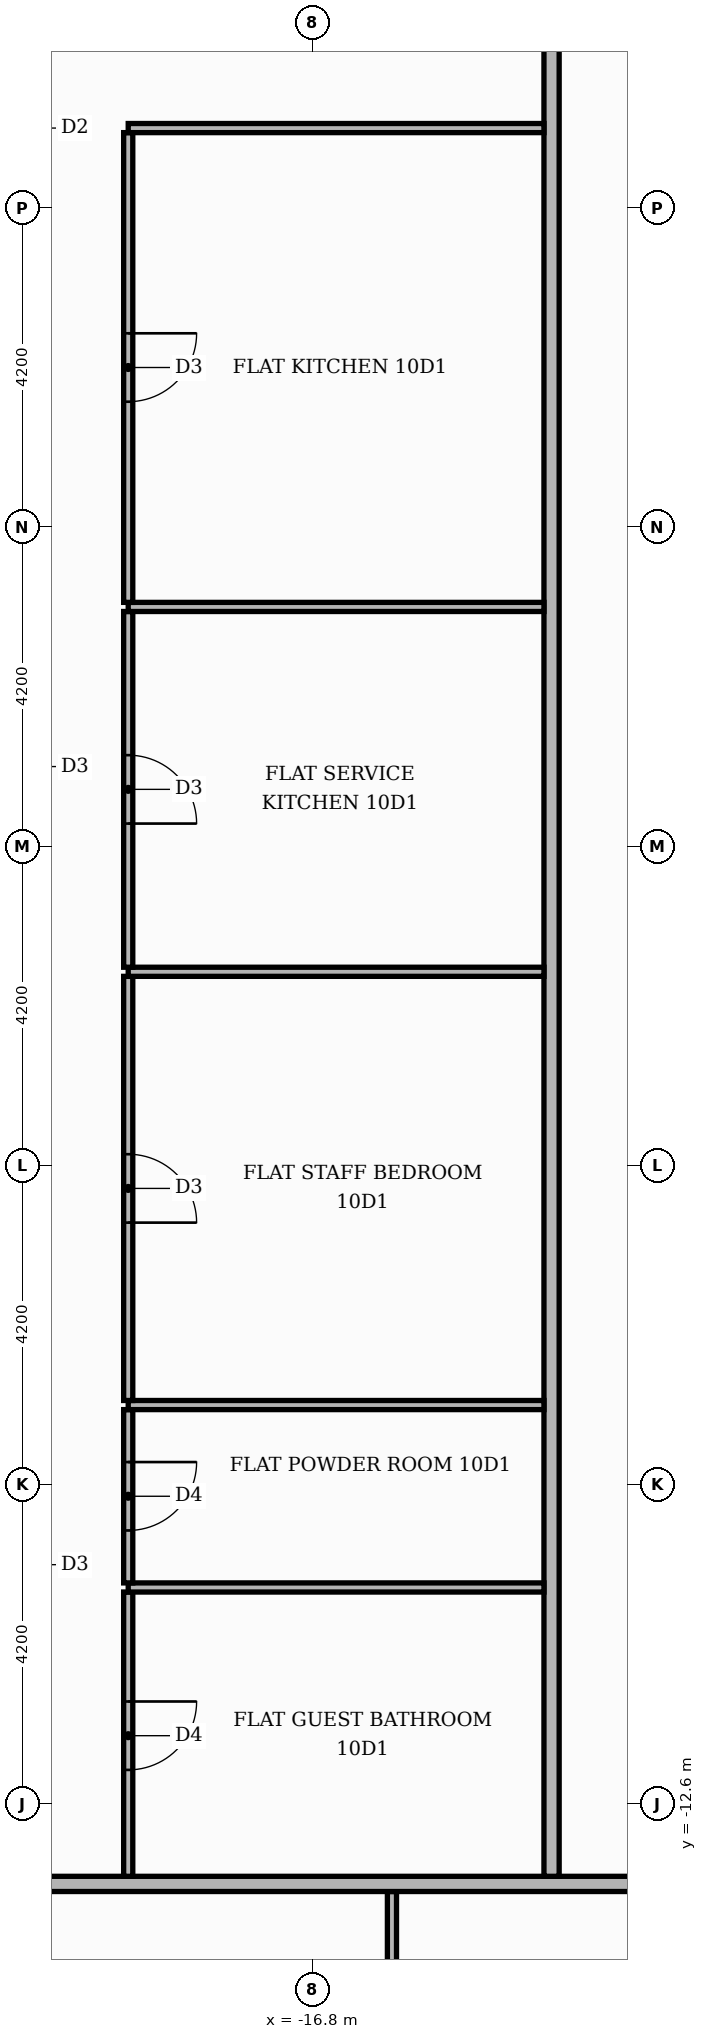
"""IFC4 building model, lengths in metres.
Left out: names, types, materials, properties, quantities, classifications, styles, units other than length and angle.
Written with IfcOpenShell. Run it as: python <this file> out.ifc"""

import sys

from ifc_helpers import new_model, si_unit, direction, frame, frame_2d, origin, place, context, subcontext, project, spatial, rectangle, extrude, element, fill, save


model = new_model("IFC4")
c1 = context("Model", 3, precision=1e-05, world=origin(), true_north=direction((0.0, 1.0)))
c2 = subcontext(c1, "Body", "Model", "MODEL_VIEW")
j1 = project(units=[si_unit("LENGTHUNIT", "METRE"), si_unit("PLANEANGLEUNIT", "RADIAN")], contexts=[c1])
p1 = place(None, origin())
s1 = spatial("IfcSite", under=j1, at=p1, CompositionType="ELEMENT")
p2 = place(p1, origin())
s2 = spatial("IfcBuilding", under=s1, at=p2, CompositionType="ELEMENT")
p3 = place(p2, frame((0.0, 0.0, 46.5)))
s3 = spatial("IfcBuildingStorey", under=s2, at=p3, CompositionType="ELEMENT", Elevation=46.5)
p4 = place(p3, frame((-15.75, -20.66, 0.0), z_axis=(0.0, 0.0, 1.0), x_axis=(0.0, 1.0, 0.0)))
e1 = element("IfcWall", 1, at=p4, inside=s3, PredefinedType="PARTITIONING", context=c2, shape_type="SweptSolid", body=[
    extrude(rectangle(XDim=6.91, YDim=0.12, at=frame_2d((3.455, 0.0))), origin(), (0.0, 0.0, 1.0), 3.48),
])
p5 = place(p4, frame((2.975, 0.0, 0.0)))
e2 = element("IfcOpeningElement", 2, at=p5, cuts=e1, PredefinedType="OPENING", context=c2, shape_type="SweptSolid", body=[
    extrude(rectangle(XDim=1.0, YDim=2.1, at=frame_2d((0.5, 1.05))), frame((0.0, 0.07, 0.0), z_axis=(0.0, -1.0, 0.0), x_axis=(1.0, 0.0, 0.0)), (0.0, 0.0, 1.0), 0.14),
])
p6 = place(p3, frame((-25.42, -13.65, 0.0), z_axis=(0.0, 0.0, 1.0), x_axis=(1.0, 0.0, 0.0)))
e3 = element("IfcWall", 3, at=p6, inside=s3, PredefinedType="PARTITIONING", context=c2, shape_type="SweptSolid", body=[
    extrude(rectangle(XDim=39.07, YDim=0.2, at=frame_2d((19.535, 0.0))), origin(), (0.0, 0.0, 1.0), 3.48),
])
p7 = place(p6, frame((13.32, 0.0, 0.0)))
e4 = element("IfcOpeningElement", 4, at=p7, cuts=e3, PredefinedType="OPENING", context=c2, shape_type="SweptSolid", body=[
    extrude(rectangle(XDim=1.1, YDim=2.4, at=frame_2d((0.55, 1.2))), frame((0.0, 0.11, 0.0), z_axis=(0.0, -1.0, 0.0), x_axis=(1.0, 0.0, 0.0)), (0.0, 0.0, 1.0), 0.22),
])
p8 = place(p6, frame((21.72, 0.0, 0.0)))
e5 = element("IfcOpeningElement", 5, at=p8, cuts=e3, PredefinedType="OPENING", context=c2, shape_type="SweptSolid", body=[
    extrude(rectangle(XDim=1.1, YDim=2.4, at=frame_2d((0.55, 1.2))), frame((0.0, 0.11, 0.0), z_axis=(0.0, -1.0, 0.0), x_axis=(1.0, 0.0, 0.0)), (0.0, 0.0, 1.0), 0.22),
])
p9 = place(p3, frame((-19.22, -13.55, 0.0), z_axis=(0.0, 0.0, 1.0), x_axis=(0.0, 1.0, 0.0)))
e6 = element("IfcWall", 6, at=p9, inside=s3, PredefinedType="PARTITIONING", context=c2, shape_type="SweptSolid", body=[
    extrude(rectangle(XDim=3.74, YDim=0.12, at=frame_2d((1.87, 0.0))), origin(), (0.0, 0.0, 1.0), 3.48),
])
p10 = place(p9, frame((1.4, 0.0, 0.0)))
e7 = element("IfcOpeningElement", 7, at=p10, cuts=e6, PredefinedType="OPENING", context=c2, shape_type="SweptSolid", body=[
    extrude(rectangle(XDim=0.9, YDim=2.1, at=frame_2d((0.45, 1.05))), frame((0.0, 0.07, 0.0), z_axis=(0.0, -1.0, 0.0), x_axis=(1.0, 0.0, 0.0)), (0.0, 0.0, 1.0), 0.14),
])
p11 = place(p3, frame((-13.65, -13.55, 0.0), z_axis=(0.0, 0.0, 1.0), x_axis=(0.0, 1.0, 0.0)))
e8 = element("IfcWall", 8, at=p11, inside=s3, PredefinedType="PARTITIONING", context=c2, shape_type="SweptSolid", body=[
    extrude(rectangle(XDim=27.1, YDim=0.2, at=frame_2d((13.55, 0.0))), origin(), (0.0, 0.0, 1.0), 3.48),
])
p12 = place(p11, frame((24.55, 0.0, 0.0)))
e9 = element("IfcOpeningElement", 9, at=p12, cuts=e8, PredefinedType="OPENING", context=c2, shape_type="SweptSolid", body=[
    extrude(rectangle(XDim=1.1, YDim=2.4, at=frame_2d((0.55, 1.2))), frame((0.0, 0.11, 0.0), z_axis=(0.0, -1.0, 0.0), x_axis=(1.0, 0.0, 0.0)), (0.0, 0.0, 1.0), 0.22),
])
p13 = place(p3, frame((-19.22, -9.75, 0.0), z_axis=(0.0, 0.0, 1.0), x_axis=(1.0, 0.0, 0.0)))
e10 = element("IfcWall", 10, at=p13, inside=s3, PredefinedType="PARTITIONING", context=c2, shape_type="SweptSolid", body=[
    extrude(rectangle(XDim=5.47, YDim=0.12, at=frame_2d((2.735, 0.0))), origin(), (0.0, 0.0, 1.0), 3.48),
])
p14 = place(p3, frame((-19.22, -9.69, 0.0), z_axis=(0.0, 0.0, 1.0), x_axis=(0.0, 1.0, 0.0)))
e11 = element("IfcWall", 11, at=p14, inside=s3, PredefinedType="PARTITIONING", context=c2, shape_type="SweptSolid", body=[
    extrude(rectangle(XDim=2.28, YDim=0.12, at=frame_2d((1.14, 0.0))), origin(), (0.0, 0.0, 1.0), 3.48),
])
p15 = place(p14, frame((0.69, 0.0, 0.0)))
e12 = element("IfcOpeningElement", 12, at=p15, cuts=e11, PredefinedType="OPENING", context=c2, shape_type="SweptSolid", body=[
    extrude(rectangle(XDim=0.9, YDim=2.1, at=frame_2d((0.45, 1.05))), frame((0.0, 0.07, 0.0), z_axis=(0.0, -1.0, 0.0), x_axis=(1.0, 0.0, 0.0)), (0.0, 0.0, 1.0), 0.14),
])
p16 = place(p3, frame((-19.22, -7.35, 0.0), z_axis=(0.0, 0.0, 1.0), x_axis=(1.0, 0.0, 0.0)))
e13 = element("IfcWall", 13, at=p16, inside=s3, PredefinedType="PARTITIONING", context=c2, shape_type="SweptSolid", body=[
    extrude(rectangle(XDim=5.47, YDim=0.12, at=frame_2d((2.735, 0.0))), origin(), (0.0, 0.0, 1.0), 3.48),
])
p17 = place(p3, frame((-19.22, -7.29, 0.0), z_axis=(0.0, 0.0, 1.0), x_axis=(0.0, 1.0, 0.0)))
e14 = element("IfcWall", 14, at=p17, inside=s3, PredefinedType="PARTITIONING", context=c2, shape_type="SweptSolid", body=[
    extrude(rectangle(XDim=5.58, YDim=0.12, at=frame_2d((2.79, 0.0))), origin(), (0.0, 0.0, 1.0), 3.48),
])
p18 = place(p17, frame((2.34, 0.0, 0.0)))
e15 = element("IfcOpeningElement", 15, at=p18, cuts=e14, PredefinedType="OPENING", context=c2, shape_type="SweptSolid", body=[
    extrude(rectangle(XDim=0.9, YDim=2.1, at=frame_2d((0.45, 1.05))), frame((0.0, 0.07, 0.0), z_axis=(0.0, -1.0, 0.0), x_axis=(1.0, 0.0, 0.0)), (0.0, 0.0, 1.0), 0.14),
])
p19 = place(p3, frame((-19.22, -1.65, 0.0), z_axis=(0.0, 0.0, 1.0), x_axis=(1.0, 0.0, 0.0)))
e16 = element("IfcWall", 16, at=p19, inside=s3, PredefinedType="PARTITIONING", context=c2, shape_type="SweptSolid", body=[
    extrude(rectangle(XDim=5.47, YDim=0.12, at=frame_2d((2.735, 0.0))), origin(), (0.0, 0.0, 1.0), 3.48),
])
p20 = place(p3, frame((-19.22, -1.59, 0.0), z_axis=(0.0, 0.0, 1.0), x_axis=(0.0, 1.0, 0.0)))
e17 = element("IfcWall", 17, at=p20, inside=s3, PredefinedType="PARTITIONING", context=c2, shape_type="SweptSolid", body=[
    extrude(rectangle(XDim=4.68, YDim=0.12, at=frame_2d((2.34, 0.0))), origin(), (0.0, 0.0, 1.0), 3.48),
])
p21 = place(p20, frame((1.89, 0.0, 0.0)))
e18 = element("IfcOpeningElement", 18, at=p21, cuts=e17, PredefinedType="OPENING", context=c2, shape_type="SweptSolid", body=[
    extrude(rectangle(XDim=0.9, YDim=2.1, at=frame_2d((0.45, 1.05))), frame((0.0, 0.07, 0.0), z_axis=(0.0, -1.0, 0.0), x_axis=(1.0, 0.0, 0.0)), (0.0, 0.0, 1.0), 0.14),
])
p22 = place(p3, frame((-19.22, 3.15, 0.0), z_axis=(0.0, 0.0, 1.0), x_axis=(1.0, 0.0, 0.0)))
e19 = element("IfcWall", 19, at=p22, inside=s3, PredefinedType="PARTITIONING", context=c2, shape_type="SweptSolid", body=[
    extrude(rectangle(XDim=5.47, YDim=0.12, at=frame_2d((2.735, 0.0))), origin(), (0.0, 0.0, 1.0), 3.48),
])
p23 = place(p3, frame((-19.22, 3.21, 0.0), z_axis=(0.0, 0.0, 1.0), x_axis=(0.0, 1.0, 0.0)))
e20 = element("IfcWall", 20, at=p23, inside=s3, PredefinedType="PARTITIONING", context=c2, shape_type="SweptSolid", body=[
    extrude(rectangle(XDim=6.18, YDim=0.12, at=frame_2d((3.09, 0.0))), origin(), (0.0, 0.0, 1.0), 3.48),
])
p24 = place(p23, frame((2.64, 0.0, 0.0)))
e21 = element("IfcOpeningElement", 21, at=p24, cuts=e20, PredefinedType="OPENING", context=c2, shape_type="SweptSolid", body=[
    extrude(rectangle(XDim=0.9, YDim=2.1, at=frame_2d((0.45, 1.05))), frame((0.0, 0.07, 0.0), z_axis=(0.0, -1.0, 0.0), x_axis=(1.0, 0.0, 0.0)), (0.0, 0.0, 1.0), 0.14),
])
p25 = place(p3, frame((-19.22, 9.45, 0.0), z_axis=(0.0, 0.0, 1.0), x_axis=(1.0, 0.0, 0.0)))
e22 = element("IfcWall", 22, at=p25, inside=s3, PredefinedType="PARTITIONING", context=c2, shape_type="SweptSolid", body=[
    extrude(rectangle(XDim=5.47, YDim=0.12, at=frame_2d((2.735, 0.0))), origin(), (0.0, 0.0, 1.0), 3.48),
])
p26 = place(p24, frame((0.9, 0.0, 0.0), z_axis=(0.0, 0.0, 1.0), x_axis=(-1.0, 0.0, 0.0)))
e23 = element("IfcDoor", 23, at=p26, inside=s3, OperationType="SINGLE_SWING_RIGHT", PredefinedType="DOOR", context=c2, shape_type="SweptSolid", body=[
    extrude(rectangle(XDim=0.9, YDim=2.1, at=frame_2d((0.45, 1.05))), frame((0.0, 0.025, 0.0), z_axis=(0.0, -1.0, 0.0), x_axis=(1.0, 0.0, 0.0)), (0.0, 0.0, 1.0), 0.05),
])
fill(e21, e23)
p27 = place(p21, frame((0.9, 0.0, 0.0), z_axis=(0.0, 0.0, 1.0), x_axis=(-1.0, 0.0, 0.0)))
e24 = element("IfcDoor", 24, at=p27, inside=s3, OperationType="SINGLE_SWING_LEFT", PredefinedType="DOOR", context=c2, shape_type="SweptSolid", body=[
    extrude(rectangle(XDim=0.9, YDim=2.1, at=frame_2d((0.45, 1.05))), frame((0.0, 0.025, 0.0), z_axis=(0.0, -1.0, 0.0), x_axis=(1.0, 0.0, 0.0)), (0.0, 0.0, 1.0), 0.05),
])
fill(e18, e24)
p28 = place(p18, frame((0.9, 0.0, 0.0), z_axis=(0.0, 0.0, 1.0), x_axis=(-1.0, 0.0, 0.0)))
e25 = element("IfcDoor", 25, at=p28, inside=s3, OperationType="SINGLE_SWING_LEFT", PredefinedType="DOOR", context=c2, shape_type="SweptSolid", body=[
    extrude(rectangle(XDim=0.9, YDim=2.1, at=frame_2d((0.45, 1.05))), frame((0.0, 0.025, 0.0), z_axis=(0.0, -1.0, 0.0), x_axis=(1.0, 0.0, 0.0)), (0.0, 0.0, 1.0), 0.05),
])
fill(e15, e25)
p29 = place(p15, frame((0.9, 0.0, 0.0), z_axis=(0.0, 0.0, 1.0), x_axis=(-1.0, 0.0, 0.0)))
e26 = element("IfcDoor", 26, at=p29, inside=s3, OperationType="SINGLE_SWING_RIGHT", PredefinedType="DOOR", context=c2, shape_type="SweptSolid", body=[
    extrude(rectangle(XDim=0.9, YDim=2.1, at=frame_2d((0.45, 1.05))), frame((0.0, 0.025, 0.0), z_axis=(0.0, -1.0, 0.0), x_axis=(1.0, 0.0, 0.0)), (0.0, 0.0, 1.0), 0.05),
])
fill(e12, e26)
p30 = place(p10, frame((0.9, 0.0, 0.0), z_axis=(0.0, 0.0, 1.0), x_axis=(-1.0, 0.0, 0.0)))
e27 = element("IfcDoor", 27, at=p30, inside=s3, OperationType="SINGLE_SWING_RIGHT", PredefinedType="DOOR", context=c2, shape_type="SweptSolid", body=[
    extrude(rectangle(XDim=0.9, YDim=2.1, at=frame_2d((0.45, 1.05))), frame((0.0, 0.025, 0.0), z_axis=(0.0, -1.0, 0.0), x_axis=(1.0, 0.0, 0.0)), (0.0, 0.0, 1.0), 0.05),
])
fill(e7, e27)
save(model, sys.argv[1])
